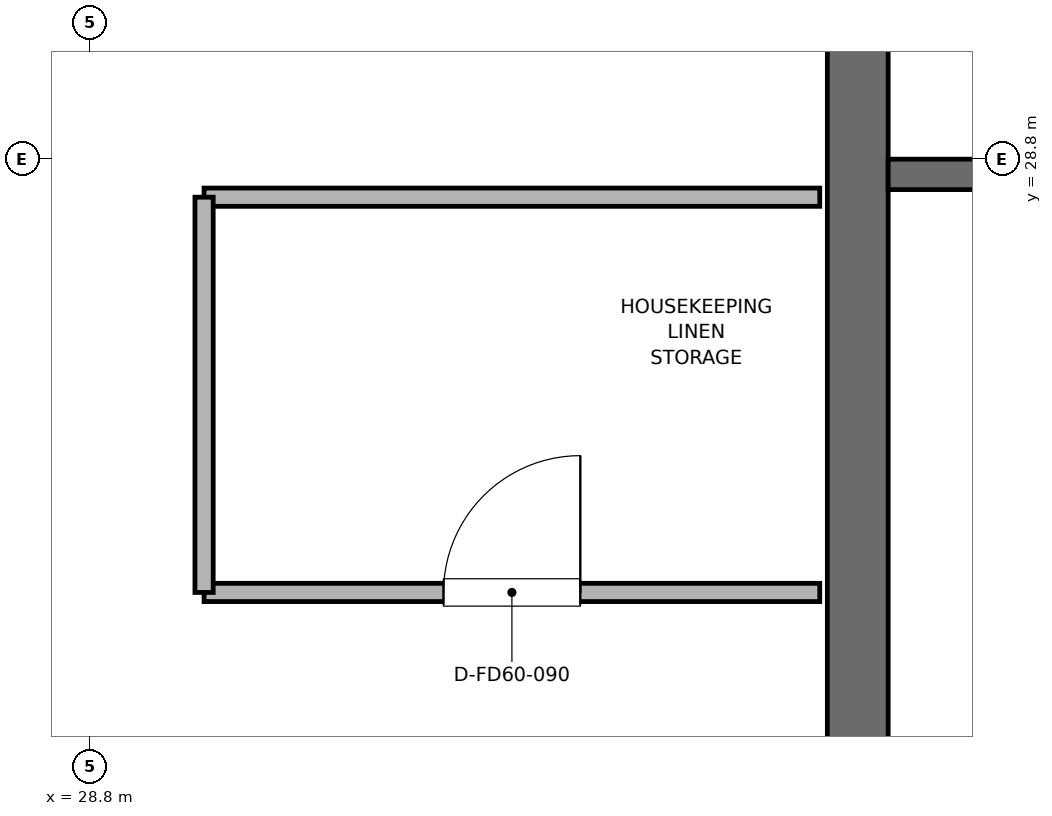
"""IFC4 building model, lengths in metres.
Left out: names, types, materials, properties, quantities, classifications, styles, units other than length and angle.
Written with IfcOpenShell. Run it as: python <this file> out.ifc"""

import sys

from ifc_helpers import new_model, si_unit, direction, frame, frame_2d, origin, place, context, subcontext, project, spatial, rectangle, extrude, element, fill, save


model = new_model("IFC4")
c1 = context("Model", 3, precision=1e-05, world=origin(), true_north=direction((0.0, 1.0)))
c2 = subcontext(c1, "Body", "Model", "MODEL_VIEW")
j1 = project(units=[si_unit("LENGTHUNIT", "METRE"), si_unit("PLANEANGLEUNIT", "RADIAN")], contexts=[c1])
p1 = place(None, origin())
s1 = spatial("IfcSite", under=j1, at=p1, CompositionType="ELEMENT")
p2 = place(p1, origin())
s2 = spatial("IfcBuilding", under=s1, at=p2, CompositionType="ELEMENT")
p3 = place(p2, frame((0.0, 0.0, 373.8)))
s3 = spatial("IfcBuildingStorey", under=s2, at=p3, CompositionType="ELEMENT", Elevation=373.8)
p4 = place(p3, frame((33.85, 20.4, 0.0), z_axis=(0.0, 0.0, 1.0), x_axis=(0.0, 1.0, 0.0)))
e1 = element("IfcWall", 1, at=p4, inside=s3, PredefinedType="SHEAR", context=c2, shape_type="SweptSolid", body=[
    extrude(rectangle(XDim=16.8, YDim=0.4, at=frame_2d((8.4, 0.0))), origin(), (0.0, 0.0, 1.0), 4.8),
])
p5 = place(p3, frame((34.05, 28.7, 0.0), z_axis=(0.0, 0.0, 1.0), x_axis=(1.0, 0.0, 0.0)))
e2 = element("IfcWall", 2, at=p5, inside=s3, PredefinedType="SHEAR", context=c2, shape_type="SweptSolid", body=[
    extrude(rectangle(XDim=3.15, YDim=0.2, at=frame_2d((1.575, 0.0))), origin(), (0.0, 0.0, 1.0), 4.5),
])
p6 = place(p5, frame((0.8, 0.0, 0.0)))
e3 = element("IfcOpeningElement", 3, at=p6, cuts=e2, PredefinedType="OPENING", context=c2, shape_type="SweptSolid", body=[
    extrude(rectangle(XDim=1.0, YDim=2.1, at=frame_2d((0.5, 1.05))), frame((0.0, 0.11, 0.0), z_axis=(0.0, -1.0, 0.0), x_axis=(1.0, 0.0, 0.0)), (0.0, 0.0, 1.0), 0.22),
])
p7 = place(p3, frame((29.55, 25.95, 0.0), z_axis=(0.0, 0.0, 1.0), x_axis=(1.0, 0.0, 0.0)))
e4 = element("IfcWall", 4, at=p7, inside=s3, PredefinedType="PARTITIONING", context=c2, shape_type="SweptSolid", body=[
    extrude(rectangle(XDim=4.05, YDim=0.12, at=frame_2d((2.025, 0.0))), origin(), (0.0, 0.0, 1.0), 4.5),
])
p8 = place(p7, frame((1.575, 0.0, 0.0)))
e5 = element("IfcOpeningElement", 5, at=p8, cuts=e4, PredefinedType="OPENING", context=c2, shape_type="SweptSolid", body=[
    extrude(rectangle(XDim=0.9, YDim=2.1, at=frame_2d((0.45, 1.05))), frame((0.0, 0.07, 0.0), z_axis=(0.0, -1.0, 0.0), x_axis=(1.0, 0.0, 0.0)), (0.0, 0.0, 1.0), 0.14),
])
p9 = place(p3, frame((29.55, 28.55, 0.0), z_axis=(0.0, 0.0, 1.0), x_axis=(1.0, 0.0, 0.0)))
e6 = element("IfcWall", 6, at=p9, inside=s3, PredefinedType="PARTITIONING", context=c2, shape_type="SweptSolid", body=[
    extrude(rectangle(XDim=4.05, YDim=0.12, at=frame_2d((2.025, 0.0))), origin(), (0.0, 0.0, 1.0), 4.5),
])
p10 = place(p3, frame((29.55, 25.95, 0.0), z_axis=(0.0, 0.0, 1.0), x_axis=(0.0, 1.0, 0.0)))
e7 = element("IfcWall", 7, at=p10, inside=s3, PredefinedType="PARTITIONING", context=c2, shape_type="SweptSolid", body=[
    extrude(rectangle(XDim=2.6, YDim=0.12, at=frame_2d((1.3, 0.0))), origin(), (0.0, 0.0, 1.0), 4.5),
])
p11 = place(p8, origin())
e8 = element("IfcDoor", 8, at=p11, inside=s3, OperationType="SINGLE_SWING_RIGHT", PredefinedType="DOOR", context=c2, shape_type="SweptSolid", body=[
    extrude(rectangle(XDim=0.9, YDim=2.1, at=frame_2d((0.45, 1.05))), frame((0.0, 0.025, 0.0), z_axis=(0.0, -1.0, 0.0), x_axis=(1.0, 0.0, 0.0)), (0.0, 0.0, 1.0), 0.05),
])
fill(e5, e8)
save(model, sys.argv[1])
